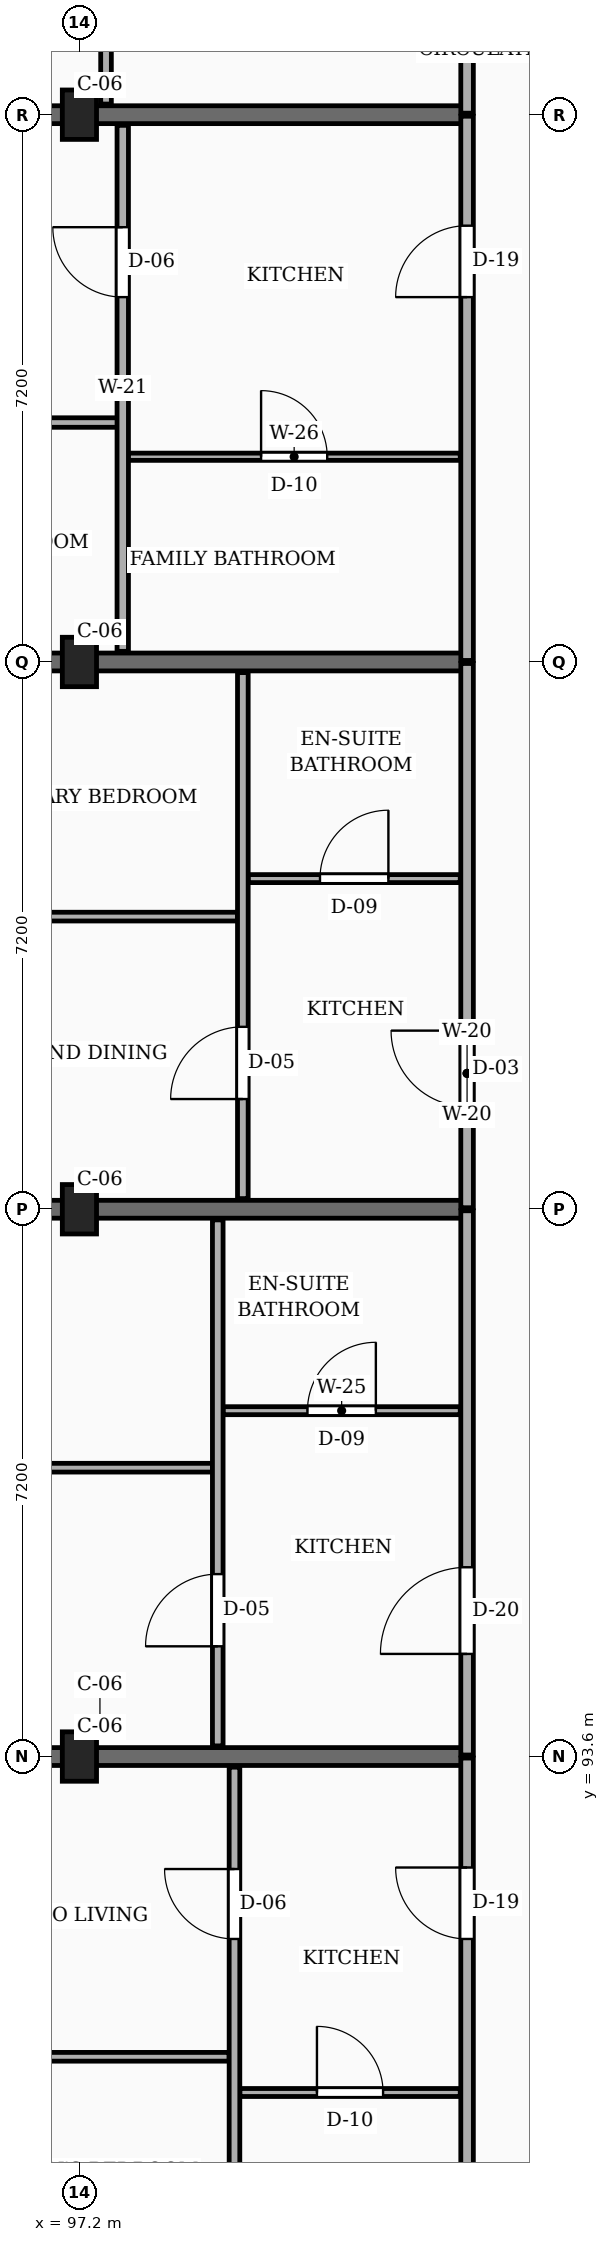
"""IFC4 building model, lengths in metres.
Left out: names, types, materials, properties, quantities, classifications, styles, units other than length and angle.
Written with IfcOpenShell. Run it as: python <this file> out.ifc"""

import sys

from ifc_helpers import new_model, si_unit, direction, frame, frame_2d, origin, origin_2d, place, context, subcontext, project, spatial, rectangle, extrude, element, fill, save


model = new_model("IFC4")
c1 = context("Model", 3, precision=1e-05, world=origin(), true_north=direction((0.0, 1.0)))
c2 = subcontext(c1, "Body", "Model", "MODEL_VIEW")
j1 = project(units=[si_unit("LENGTHUNIT", "METRE"), si_unit("PLANEANGLEUNIT", "RADIAN")], contexts=[c1])
p1 = place(None, origin())
s1 = spatial("IfcSite", under=j1, at=p1, CompositionType="ELEMENT")
p2 = place(p1, origin())
s2 = spatial("IfcBuilding", under=s1, at=p2, CompositionType="ELEMENT")
p3 = place(p2, frame((0.0, 0.0, 20.25)))
s3 = spatial("IfcBuildingStorey", under=s2, at=p3, CompositionType="ELEMENT", Elevation=20.25)
for number, where, z_axis, x_axis in (
    (1, (97.2, 93.6, 0.0), (0.0, 0.0, 1.0), (1.0, 0.0, 0.0)),
    (2, (97.2, 100.8, 0.0), (0.0, 0.0, 1.0), (1.0, 0.0, 0.0)),
    (3, (97.2, 108.0, 0.0), (0.0, 0.0, 1.0), (1.0, 0.0, 0.0)),
    (4, (97.2, 115.2, 0.0), (0.0, 0.0, 1.0), (1.0, 0.0, 0.0)),
):
    element("IfcColumn", number, at=place(p3, frame(where, z_axis=z_axis, x_axis=x_axis)), inside=s3, PredefinedType="COLUMN", context=c2, shape_type="SweptSolid", body=[
        extrude(rectangle(XDim=0.45, YDim=0.65, at=origin_2d()), origin(), (0.0, 0.0, 1.0), 3.15),
    ])
for number, where, z_axis, x_axis in (
    (5, (90.275, 93.6, 0.0), (0.0, 0.0, 1.0), (1.0, 0.0, 0.0)),
    (6, (90.275, 100.8, 0.0), (0.0, 0.0, 1.0), (1.0, 0.0, 0.0)),
    (7, (90.275, 108.0, 0.0), (0.0, 0.0, 1.0), (1.0, 0.0, 0.0)),
    (8, (90.275, 115.2, 0.0), (0.0, 0.0, 1.0), (1.0, 0.0, 0.0)),
):
    element("IfcWall", number, at=place(p3, frame(where, z_axis=z_axis, x_axis=x_axis)), inside=s3, PredefinedType="SOLIDWALL", context=c2, shape_type="SweptSolid", body=[
        extrude(rectangle(XDim=12.025, YDim=0.235, at=frame_2d((6.013, 0.0))), origin(), (0.0, 0.0, 1.0), 2.19),
    ])
p4 = place(p3, frame((102.3, 86.575, 0.0), z_axis=(0.0, 0.0, 1.0), x_axis=(0.0, 1.0, 0.0)))
e9 = element("IfcWall", 9, at=p4, inside=s3, PredefinedType="PARTITIONING", context=c2, shape_type="SweptSolid", body=[
    extrude(rectangle(XDim=7.005, YDim=0.165, at=frame_2d((3.502, 0.0))), origin(), (0.0, 0.0, 1.0), 2.325),
])
p5 = place(p4, frame((4.625, 0.0, 0.0)))
e10 = element("IfcOpeningElement", 10, at=p5, cuts=e9, PredefinedType="OPENING", context=c2, shape_type="SweptSolid", body=[
    extrude(rectangle(XDim=0.94, YDim=2.12, at=frame_2d((0.47, 1.06))), frame((0.0, 0.093, 0.0), z_axis=(0.0, -1.0, 0.0), x_axis=(1.0, 0.0, 0.0)), (0.0, 0.0, 1.0), 0.185),
])
p6 = place(p3, frame((102.3, 93.62, 0.0), z_axis=(0.0, 0.0, 1.0), x_axis=(0.0, 1.0, 0.0)))
e11 = element("IfcWall", 11, at=p6, inside=s3, PredefinedType="PARTITIONING", context=c2, shape_type="SweptSolid", body=[
    extrude(rectangle(XDim=7.16, YDim=0.165, at=frame_2d((3.58, 0.0))), origin(), (0.0, 0.0, 1.0), 2.325),
])
p7 = place(p6, frame((1.33, 0.0, 0.0)))
e12 = element("IfcOpeningElement", 12, at=p7, cuts=e11, PredefinedType="OPENING", context=c2, shape_type="SweptSolid", body=[
    extrude(rectangle(XDim=1.14, YDim=2.18, at=frame_2d((0.57, 1.09))), frame((0.0, 0.093, 0.0), z_axis=(0.0, -1.0, 0.0), x_axis=(1.0, 0.0, 0.0)), (0.0, 0.0, 1.0), 0.185),
])
p8 = place(p3, frame((102.3, 100.82, 0.0), z_axis=(0.0, 0.0, 1.0), x_axis=(0.0, 1.0, 0.0)))
e13 = element("IfcWall", 13, at=p8, inside=s3, PredefinedType="PARTITIONING", context=c2, shape_type="SweptSolid", body=[
    extrude(rectangle(XDim=7.16, YDim=0.165, at=frame_2d((3.58, 0.0))), origin(), (0.0, 0.0, 1.0), 2.325),
])
p9 = place(p8, frame((1.33, 0.0, 0.0)))
e14 = element("IfcOpeningElement", 14, at=p9, cuts=e13, PredefinedType="OPENING", context=c2, shape_type="SweptSolid", body=[
    extrude(rectangle(XDim=1.0, YDim=2.15, at=frame_2d((0.5, 1.075))), frame((0.0, 0.093, 0.0), z_axis=(0.0, -1.0, 0.0), x_axis=(1.0, 0.0, 0.0)), (0.0, 0.0, 1.0), 0.185),
])
p10 = place(p3, frame((102.3, 108.02, 0.0), z_axis=(0.0, 0.0, 1.0), x_axis=(0.0, 1.0, 0.0)))
e15 = element("IfcWall", 15, at=p10, inside=s3, PredefinedType="PARTITIONING", context=c2, shape_type="SweptSolid", body=[
    extrude(rectangle(XDim=7.16, YDim=0.165, at=frame_2d((3.58, 0.0))), origin(), (0.0, 0.0, 1.0), 2.325),
])
p11 = place(p10, frame((4.78, 0.0, 0.0)))
e16 = element("IfcOpeningElement", 16, at=p11, cuts=e15, PredefinedType="OPENING", context=c2, shape_type="SweptSolid", body=[
    extrude(rectangle(XDim=0.94, YDim=2.12, at=frame_2d((0.47, 1.06))), frame((0.0, 0.093, 0.0), z_axis=(0.0, -1.0, 0.0), x_axis=(1.0, 0.0, 0.0)), (0.0, 0.0, 1.0), 0.185),
])
p12 = place(p3, frame((102.3, 115.22, 0.0), z_axis=(0.0, 0.0, 1.0), x_axis=(0.0, 1.0, 0.0)))
e17 = element("IfcWall", 17, at=p12, inside=s3, PredefinedType="PARTITIONING", context=c2, shape_type="SweptSolid", body=[
    extrude(rectangle(XDim=7.16, YDim=0.165, at=frame_2d((3.58, 0.0))), origin(), (0.0, 0.0, 1.0), 2.325),
])
p13 = place(p12, frame((4.78, 0.0, 0.0)))
e18 = element("IfcOpeningElement", 18, at=p13, cuts=e17, PredefinedType="OPENING", context=c2, shape_type="SweptSolid", body=[
    extrude(rectangle(XDim=1.14, YDim=2.18, at=frame_2d((0.57, 1.09))), frame((0.0, 0.093, 0.0), z_axis=(0.0, -1.0, 0.0), x_axis=(1.0, 0.0, 0.0)), (0.0, 0.0, 1.0), 0.185),
])
p14 = place(p3, frame((90.175, 89.65, 0.0), z_axis=(0.0, 0.0, 1.0), x_axis=(1.0, 0.0, 0.0)))
e19 = element("IfcWall", 19, at=p14, inside=s3, PredefinedType="PARTITIONING", context=c2, shape_type="SweptSolid", body=[
    extrude(rectangle(XDim=8.995, YDim=0.115, at=frame_2d((4.498, 0.0))), origin(), (0.0, 0.0, 1.0), 2.325),
])
p15 = place(p14, frame((4.058, 0.0, 0.0)))
e20 = element("IfcOpeningElement", 20, at=p15, cuts=e19, PredefinedType="OPENING", context=c2, shape_type="SweptSolid", body=[
    extrude(rectangle(XDim=0.88, YDim=2.08, at=frame_2d((0.44, 1.04))), frame((0.0, 0.067, 0.0), z_axis=(0.0, -1.0, 0.0), x_axis=(1.0, 0.0, 0.0)), (0.0, 0.0, 1.0), 0.135),
])
p16 = place(p3, frame((99.31, 89.18, 0.0), z_axis=(0.0, 0.0, 1.0), x_axis=(1.0, 0.0, 0.0)))
e21 = element("IfcWall", 21, at=p16, inside=s3, PredefinedType="PARTITIONING", context=c2, shape_type="SweptSolid", body=[
    extrude(rectangle(XDim=2.9, YDim=0.105, at=frame_2d((1.45, 0.0))), origin(), (0.0, 0.0, 1.0), 2.325),
])
p17 = place(p16, frame((1.015, 0.0, 0.0)))
e22 = element("IfcOpeningElement", 22, at=p17, cuts=e21, PredefinedType="OPENING", context=c2, shape_type="SweptSolid", body=[
    extrude(rectangle(XDim=0.87, YDim=2.05, at=frame_2d((0.435, 1.025))), frame((0.0, 0.062, 0.0), z_axis=(0.0, -1.0, 0.0), x_axis=(1.0, 0.0, 0.0)), (0.0, 0.0, 1.0), 0.125),
])
p18 = place(p3, frame((99.24, 86.575, 0.0), z_axis=(0.0, 0.0, 1.0), x_axis=(0.0, 1.0, 0.0)))
e23 = element("IfcWall", 23, at=p18, inside=s3, PredefinedType="PARTITIONING", context=c2, shape_type="SweptSolid", body=[
    extrude(rectangle(XDim=6.885, YDim=0.14, at=frame_2d((3.442, 0.0))), origin(), (0.0, 0.0, 1.0), 2.325),
])
p19 = place(p18, frame((4.625, 0.0, 0.0)))
e24 = element("IfcOpeningElement", 24, at=p19, cuts=e23, PredefinedType="OPENING", context=c2, shape_type="SweptSolid", body=[
    extrude(rectangle(XDim=0.92, YDim=2.1, at=frame_2d((0.46, 1.05))), frame((0.0, 0.08, 0.0), z_axis=(0.0, -1.0, 0.0), x_axis=(1.0, 0.0, 0.0)), (0.0, 0.0, 1.0), 0.16),
])
p20 = place(p3, frame((90.175, 97.4, 0.0), z_axis=(0.0, 0.0, 1.0), x_axis=(1.0, 0.0, 0.0)))
e25 = element("IfcWall", 25, at=p20, inside=s3, PredefinedType="PARTITIONING", context=c2, shape_type="SweptSolid", body=[
    extrude(rectangle(XDim=8.775, YDim=0.115, at=frame_2d((4.387, 0.0))), origin(), (0.0, 0.0, 1.0), 2.325),
])
p21 = place(p20, frame((3.938, 0.0, 0.0)))
e26 = element("IfcOpeningElement", 26, at=p21, cuts=e25, PredefinedType="OPENING", context=c2, shape_type="SweptSolid", body=[
    extrude(rectangle(XDim=0.9, YDim=2.1, at=frame_2d((0.45, 1.05))), frame((0.0, 0.067, 0.0), z_axis=(0.0, -1.0, 0.0), x_axis=(1.0, 0.0, 0.0)), (0.0, 0.0, 1.0), 0.135),
])
p22 = place(p3, frame((99.09, 98.15, 0.0), z_axis=(0.0, 0.0, 1.0), x_axis=(1.0, 0.0, 0.0)))
e27 = element("IfcWall", 27, at=p22, inside=s3, PredefinedType="PARTITIONING", context=c2, shape_type="SweptSolid", body=[
    extrude(rectangle(XDim=3.12, YDim=0.105, at=frame_2d((1.56, 0.0))), origin(), (0.0, 0.0, 1.0), 2.325),
])
p23 = place(p22, frame((1.11, 0.0, 0.0)))
e28 = element("IfcOpeningElement", 28, at=p23, cuts=e27, PredefinedType="OPENING", context=c2, shape_type="SweptSolid", body=[
    extrude(rectangle(XDim=0.9, YDim=2.05, at=frame_2d((0.45, 1.025))), frame((0.0, 0.062, 0.0), z_axis=(0.0, -1.0, 0.0), x_axis=(1.0, 0.0, 0.0)), (0.0, 0.0, 1.0), 0.125),
])
p24 = place(p3, frame((99.02, 93.74, 0.0), z_axis=(0.0, 0.0, 1.0), x_axis=(0.0, 1.0, 0.0)))
e29 = element("IfcWall", 29, at=p24, inside=s3, PredefinedType="PARTITIONING", context=c2, shape_type="SweptSolid", body=[
    extrude(rectangle(XDim=6.92, YDim=0.14, at=frame_2d((3.46, 0.0))), origin(), (0.0, 0.0, 1.0), 2.325),
])
p25 = place(p24, frame((1.31, 0.0, 0.0)))
e30 = element("IfcOpeningElement", 30, at=p25, cuts=e29, PredefinedType="OPENING", context=c2, shape_type="SweptSolid", body=[
    extrude(rectangle(XDim=0.95, YDim=2.1, at=frame_2d((0.475, 1.05))), frame((0.0, 0.08, 0.0), z_axis=(0.0, -1.0, 0.0), x_axis=(1.0, 0.0, 0.0)), (0.0, 0.0, 1.0), 0.16),
])
p26 = place(p3, frame((90.175, 104.65, 0.0), z_axis=(0.0, 0.0, 1.0), x_axis=(1.0, 0.0, 0.0)))
e31 = element("IfcWall", 31, at=p26, inside=s3, PredefinedType="PARTITIONING", context=c2, shape_type="SweptSolid", body=[
    extrude(rectangle(XDim=9.105, YDim=0.115, at=frame_2d((4.552, 0.0))), origin(), (0.0, 0.0, 1.0), 2.325),
])
p27 = place(p26, frame((4.103, 0.0, 0.0)))
e32 = element("IfcOpeningElement", 32, at=p27, cuts=e31, PredefinedType="OPENING", context=c2, shape_type="SweptSolid", body=[
    extrude(rectangle(XDim=0.9, YDim=2.1, at=frame_2d((0.45, 1.05))), frame((0.0, 0.067, 0.0), z_axis=(0.0, -1.0, 0.0), x_axis=(1.0, 0.0, 0.0)), (0.0, 0.0, 1.0), 0.135),
])
p28 = place(p3, frame((99.42, 105.15, 0.0), z_axis=(0.0, 0.0, 1.0), x_axis=(1.0, 0.0, 0.0)))
e33 = element("IfcWall", 33, at=p28, inside=s3, PredefinedType="PARTITIONING", context=c2, shape_type="SweptSolid", body=[
    extrude(rectangle(XDim=2.79, YDim=0.105, at=frame_2d((1.395, 0.0))), origin(), (0.0, 0.0, 1.0), 2.325),
])
p29 = place(p28, frame((0.945, 0.0, 0.0)))
e34 = element("IfcOpeningElement", 34, at=p29, cuts=e33, PredefinedType="OPENING", context=c2, shape_type="SweptSolid", body=[
    extrude(rectangle(XDim=0.9, YDim=2.05, at=frame_2d((0.45, 1.025))), frame((0.0, 0.062, 0.0), z_axis=(0.0, -1.0, 0.0), x_axis=(1.0, 0.0, 0.0)), (0.0, 0.0, 1.0), 0.125),
])
p30 = place(p3, frame((99.35, 100.94, 0.0), z_axis=(0.0, 0.0, 1.0), x_axis=(0.0, 1.0, 0.0)))
e35 = element("IfcWall", 35, at=p30, inside=s3, PredefinedType="PARTITIONING", context=c2, shape_type="SweptSolid", body=[
    extrude(rectangle(XDim=6.92, YDim=0.14, at=frame_2d((3.46, 0.0))), origin(), (0.0, 0.0, 1.0), 2.325),
])
p31 = place(p30, frame((1.31, 0.0, 0.0)))
e36 = element("IfcOpeningElement", 36, at=p31, cuts=e35, PredefinedType="OPENING", context=c2, shape_type="SweptSolid", body=[
    extrude(rectangle(XDim=0.95, YDim=2.1, at=frame_2d((0.475, 1.05))), frame((0.0, 0.08, 0.0), z_axis=(0.0, -1.0, 0.0), x_axis=(1.0, 0.0, 0.0)), (0.0, 0.0, 1.0), 0.16),
])
p32 = place(p3, frame((90.175, 111.15, 0.0), z_axis=(0.0, 0.0, 1.0), x_axis=(1.0, 0.0, 0.0)))
e37 = element("IfcWall", 37, at=p32, inside=s3, PredefinedType="PARTITIONING", context=c2, shape_type="SweptSolid", body=[
    extrude(rectangle(XDim=7.525, YDim=0.125, at=frame_2d((3.762, 0.0))), origin(), (0.0, 0.0, 1.0), 2.325),
])
p33 = place(p32, frame((3.323, 0.0, 0.0)))
e38 = element("IfcOpeningElement", 38, at=p33, cuts=e37, PredefinedType="OPENING", context=c2, shape_type="SweptSolid", body=[
    extrude(rectangle(XDim=0.88, YDim=2.08, at=frame_2d((0.44, 1.04))), frame((0.0, 0.073, 0.0), z_axis=(0.0, -1.0, 0.0), x_axis=(1.0, 0.0, 0.0)), (0.0, 0.0, 1.0), 0.145),
])
p34 = place(p3, frame((97.84, 110.7, 0.0), z_axis=(0.0, 0.0, 1.0), x_axis=(1.0, 0.0, 0.0)))
e39 = element("IfcWall", 39, at=p34, inside=s3, PredefinedType="PARTITIONING", context=c2, shape_type="SweptSolid", body=[
    extrude(rectangle(XDim=4.37, YDim=0.095, at=frame_2d((2.185, 0.0))), origin(), (0.0, 0.0, 1.0), 2.325),
])
p35 = place(p34, frame((1.75, 0.0, 0.0)))
e40 = element("IfcOpeningElement", 40, at=p35, cuts=e39, PredefinedType="OPENING", context=c2, shape_type="SweptSolid", body=[
    extrude(rectangle(XDim=0.87, YDim=2.05, at=frame_2d((0.435, 1.025))), frame((0.0, 0.058, 0.0), z_axis=(0.0, -1.0, 0.0), x_axis=(1.0, 0.0, 0.0)), (0.0, 0.0, 1.0), 0.115),
])
p36 = place(p3, frame((97.77, 108.14, 0.0), z_axis=(0.0, 0.0, 1.0), x_axis=(0.0, 1.0, 0.0)))
e41 = element("IfcWall", 41, at=p36, inside=s3, PredefinedType="PARTITIONING", context=c2, shape_type="SweptSolid", body=[
    extrude(rectangle(XDim=6.92, YDim=0.15, at=frame_2d((3.46, 0.0))), origin(), (0.0, 0.0, 1.0), 2.325),
])
p37 = place(p36, frame((4.66, 0.0, 0.0)))
e42 = element("IfcOpeningElement", 42, at=p37, cuts=e41, PredefinedType="OPENING", context=c2, shape_type="SweptSolid", body=[
    extrude(rectangle(XDim=0.92, YDim=2.1, at=frame_2d((0.46, 1.05))), frame((0.0, 0.085, 0.0), z_axis=(0.0, -1.0, 0.0), x_axis=(1.0, 0.0, 0.0)), (0.0, 0.0, 1.0), 0.17),
])
p38 = place(p3, frame((97.55, 115.34, 0.0), z_axis=(0.0, 0.0, 1.0), x_axis=(0.0, 1.0, 0.0)))
e43 = element("IfcWall", 43, at=p38, inside=s3, PredefinedType="PARTITIONING", context=c2, shape_type="SweptSolid", body=[
    extrude(rectangle(XDim=6.92, YDim=0.14, at=frame_2d((3.46, 0.0))), origin(), (0.0, 0.0, 1.0), 2.325),
])
p39 = place(p38, frame((4.66, 0.0, 0.0)))
e44 = element("IfcOpeningElement", 44, at=p39, cuts=e43, PredefinedType="OPENING", context=c2, shape_type="SweptSolid", body=[
    extrude(rectangle(XDim=0.95, YDim=2.1, at=frame_2d((0.475, 1.05))), frame((0.0, 0.08, 0.0), z_axis=(0.0, -1.0, 0.0), x_axis=(1.0, 0.0, 0.0)), (0.0, 0.0, 1.0), 0.16),
])
p40 = place(p5, origin())
e45 = element("IfcDoor", 45, at=p40, inside=s3, OperationType="SINGLE_SWING_RIGHT", PredefinedType="DOOR", context=c2, shape_type="SweptSolid", body=[
    extrude(rectangle(XDim=0.94, YDim=2.12, at=frame_2d((0.47, 1.06))), frame((0.0, 0.025, 0.0), z_axis=(0.0, -1.0, 0.0), x_axis=(1.0, 0.0, 0.0)), (0.0, 0.0, 1.0), 0.05),
])
fill(e10, e45)
p41 = place(p7, origin())
e46 = element("IfcDoor", 46, at=p41, inside=s3, OperationType="SINGLE_SWING_LEFT", PredefinedType="DOOR", context=c2, shape_type="SweptSolid", body=[
    extrude(rectangle(XDim=1.14, YDim=2.18, at=frame_2d((0.57, 1.09))), frame((0.0, 0.025, 0.0), z_axis=(0.0, -1.0, 0.0), x_axis=(1.0, 0.0, 0.0)), (0.0, 0.0, 1.0), 0.05),
])
fill(e12, e46)
p42 = place(p9, origin())
e47 = element("IfcDoor", 47, at=p42, inside=s3, OperationType="SINGLE_SWING_RIGHT", PredefinedType="DOOR", context=c2, shape_type="SweptSolid", body=[
    extrude(rectangle(XDim=1.0, YDim=2.15, at=frame_2d((0.5, 1.075))), frame((0.0, 0.025, 0.0), z_axis=(0.0, -1.0, 0.0), x_axis=(1.0, 0.0, 0.0)), (0.0, 0.0, 1.0), 0.05),
])
fill(e14, e47)
p43 = place(p11, origin())
e48 = element("IfcDoor", 48, at=p43, inside=s3, OperationType="SINGLE_SWING_LEFT", PredefinedType="DOOR", context=c2, shape_type="SweptSolid", body=[
    extrude(rectangle(XDim=0.94, YDim=2.12, at=frame_2d((0.47, 1.06))), frame((0.0, 0.025, 0.0), z_axis=(0.0, -1.0, 0.0), x_axis=(1.0, 0.0, 0.0)), (0.0, 0.0, 1.0), 0.05),
])
fill(e16, e48)
p44 = place(p17, origin())
e49 = element("IfcDoor", 49, at=p44, inside=s3, OperationType="SINGLE_SWING_LEFT", PredefinedType="DOOR", context=c2, shape_type="SweptSolid", body=[
    extrude(rectangle(XDim=0.87, YDim=2.05, at=frame_2d((0.435, 1.025))), frame((0.0, 0.025, 0.0), z_axis=(0.0, -1.0, 0.0), x_axis=(1.0, 0.0, 0.0)), (0.0, 0.0, 1.0), 0.05),
])
fill(e22, e49)
p45 = place(p19, origin())
e50 = element("IfcDoor", 50, at=p45, inside=s3, OperationType="SINGLE_SWING_RIGHT", PredefinedType="DOOR", context=c2, shape_type="SweptSolid", body=[
    extrude(rectangle(XDim=0.92, YDim=2.1, at=frame_2d((0.46, 1.05))), frame((0.0, 0.025, 0.0), z_axis=(0.0, -1.0, 0.0), x_axis=(1.0, 0.0, 0.0)), (0.0, 0.0, 1.0), 0.05),
])
fill(e24, e50)
p46 = place(p23, origin())
e51 = element("IfcDoor", 51, at=p46, inside=s3, OperationType="SINGLE_SWING_RIGHT", PredefinedType="DOOR", context=c2, shape_type="SweptSolid", body=[
    extrude(rectangle(XDim=0.9, YDim=2.05, at=frame_2d((0.45, 1.025))), frame((0.0, 0.025, 0.0), z_axis=(0.0, -1.0, 0.0), x_axis=(1.0, 0.0, 0.0)), (0.0, 0.0, 1.0), 0.05),
])
fill(e28, e51)
p47 = place(p25, origin())
e52 = element("IfcDoor", 52, at=p47, inside=s3, OperationType="SINGLE_SWING_LEFT", PredefinedType="DOOR", context=c2, shape_type="SweptSolid", body=[
    extrude(rectangle(XDim=0.95, YDim=2.1, at=frame_2d((0.475, 1.05))), frame((0.0, 0.025, 0.0), z_axis=(0.0, -1.0, 0.0), x_axis=(1.0, 0.0, 0.0)), (0.0, 0.0, 1.0), 0.05),
])
fill(e30, e52)
p48 = place(p29, origin())
e53 = element("IfcDoor", 53, at=p48, inside=s3, OperationType="SINGLE_SWING_RIGHT", PredefinedType="DOOR", context=c2, shape_type="SweptSolid", body=[
    extrude(rectangle(XDim=0.9, YDim=2.05, at=frame_2d((0.45, 1.025))), frame((0.0, 0.025, 0.0), z_axis=(0.0, -1.0, 0.0), x_axis=(1.0, 0.0, 0.0)), (0.0, 0.0, 1.0), 0.05),
])
fill(e34, e53)
p49 = place(p31, origin())
e54 = element("IfcDoor", 54, at=p49, inside=s3, OperationType="SINGLE_SWING_LEFT", PredefinedType="DOOR", context=c2, shape_type="SweptSolid", body=[
    extrude(rectangle(XDim=0.95, YDim=2.1, at=frame_2d((0.475, 1.05))), frame((0.0, 0.025, 0.0), z_axis=(0.0, -1.0, 0.0), x_axis=(1.0, 0.0, 0.0)), (0.0, 0.0, 1.0), 0.05),
])
fill(e36, e54)
p50 = place(p35, origin())
e55 = element("IfcDoor", 55, at=p50, inside=s3, OperationType="SINGLE_SWING_LEFT", PredefinedType="DOOR", context=c2, shape_type="SweptSolid", body=[
    extrude(rectangle(XDim=0.87, YDim=2.05, at=frame_2d((0.435, 1.025))), frame((0.0, 0.025, 0.0), z_axis=(0.0, -1.0, 0.0), x_axis=(1.0, 0.0, 0.0)), (0.0, 0.0, 1.0), 0.05),
])
fill(e40, e55)
p51 = place(p37, origin())
e56 = element("IfcDoor", 56, at=p51, inside=s3, OperationType="SINGLE_SWING_RIGHT", PredefinedType="DOOR", context=c2, shape_type="SweptSolid", body=[
    extrude(rectangle(XDim=0.92, YDim=2.1, at=frame_2d((0.46, 1.05))), frame((0.0, 0.025, 0.0), z_axis=(0.0, -1.0, 0.0), x_axis=(1.0, 0.0, 0.0)), (0.0, 0.0, 1.0), 0.05),
])
fill(e42, e56)
save(model, sys.argv[1])
